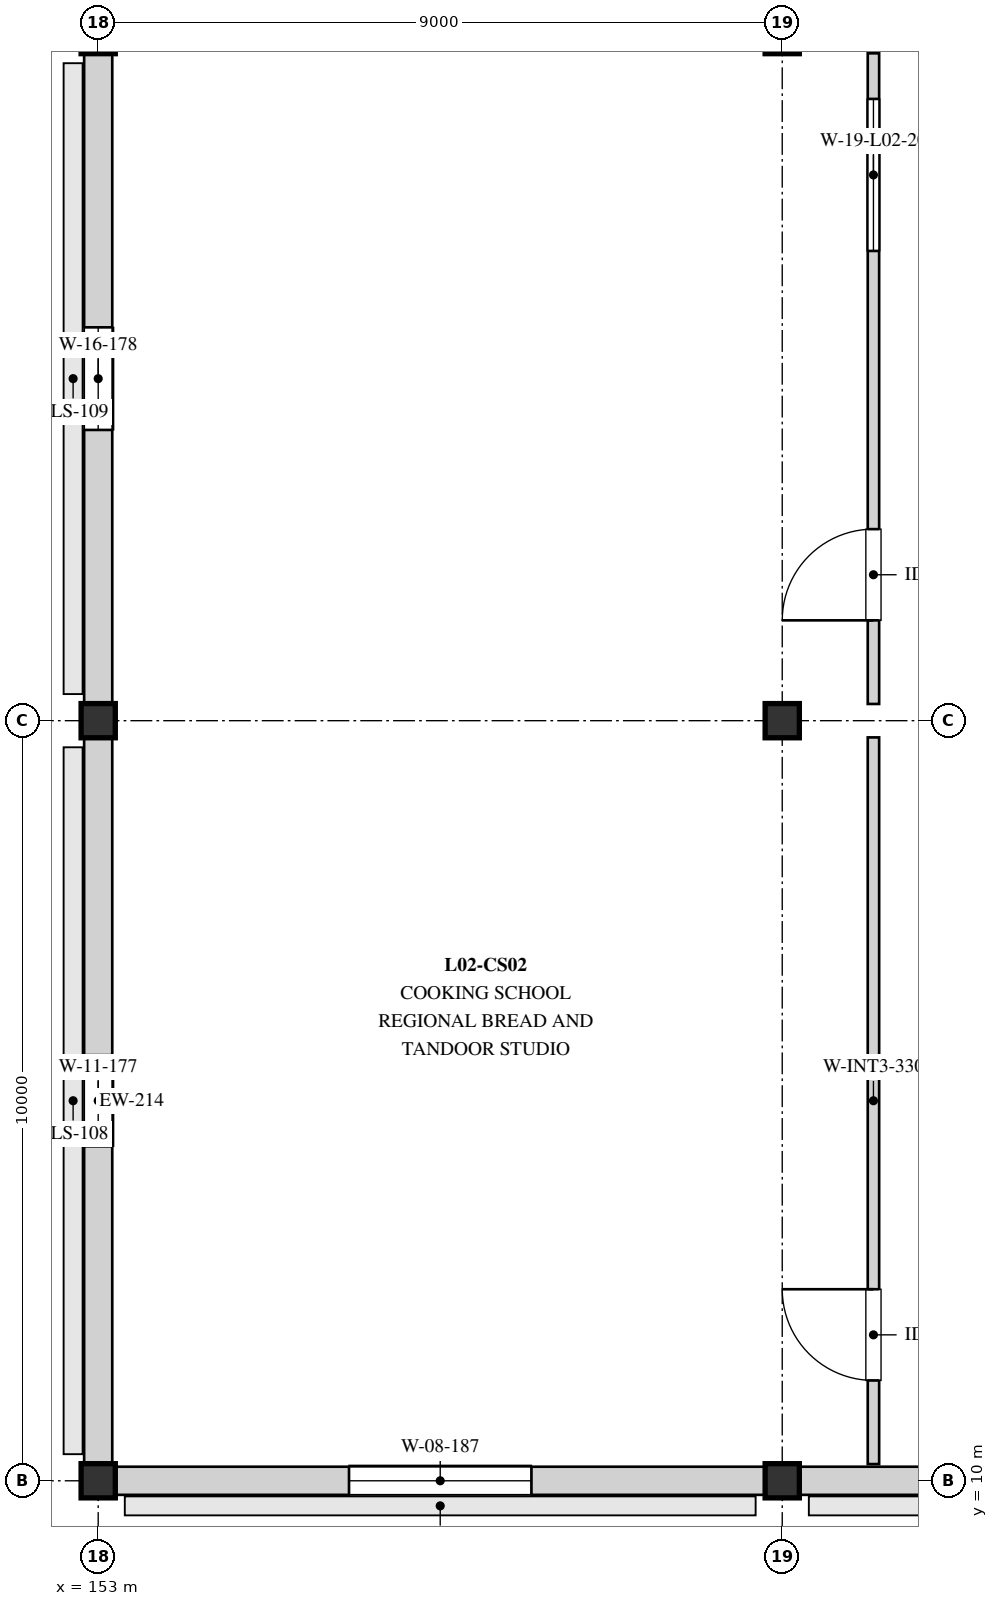
"""IFC4 building model, lengths in metres.
Left out: names, types, materials, properties, quantities, classifications, styles, units other than length and angle.
Written with IfcOpenShell. Run it as: python <this file> out.ifc"""

import sys

from ifc_helpers import new_model, si_unit, direction, frame, frame_2d, origin, origin_2d, place, context, subcontext, project, spatial, rectangle, extrude, element, fill, save


model = new_model("IFC4")
c1 = context("Model", 3, precision=1e-05, world=origin(), true_north=direction((0.0, 1.0)))
c2 = subcontext(c1, "Body", "Model", "MODEL_VIEW")
j1 = project(units=[si_unit("LENGTHUNIT", "METRE"), si_unit("PLANEANGLEUNIT", "RADIAN")], contexts=[c1])
p1 = place(None, origin())
s1 = spatial("IfcSite", under=j1, at=p1, CompositionType="ELEMENT")
p2 = place(p1, origin())
s2 = spatial("IfcBuilding", under=s1, at=p2, CompositionType="ELEMENT")
p3 = place(p2, frame((0.0, 0.0, 8.4)))
s3 = spatial("IfcBuildingStorey", under=s2, at=p3, CompositionType="ELEMENT", Elevation=8.4)
for number, where, z_axis, x_axis in (
    (1, (153.0, 10.0, 0.0), (0.0, 0.0, 1.0), (1.0, 0.0, 0.0)),
    (2, (153.0, 20.0, 0.0), (0.0, 0.0, 1.0), (1.0, 0.0, 0.0)),
    (3, (153.0, 29.0, 0.0), (0.0, 0.0, 1.0), (1.0, 0.0, 0.0)),
    (4, (162.0, 10.0, 0.0), (0.0, 0.0, 1.0), (1.0, 0.0, 0.0)),
    (5, (162.0, 20.0, 0.0), (0.0, 0.0, 1.0), (1.0, 0.0, 0.0)),
    (6, (162.0, 29.0, 0.0), (0.0, 0.0, 1.0), (1.0, 0.0, 0.0)),
):
    element("IfcColumn", number, at=place(p3, frame(where, z_axis=z_axis, x_axis=x_axis)), inside=s3, PredefinedType="COLUMN", context=c2, shape_type="SweptSolid", body=[
        extrude(rectangle(XDim=0.45, YDim=0.45, at=origin_2d()), origin(), (0.0, 0.0, 1.0), 3.6),
    ])
p4 = place(p3, frame((153.0, 10.0, 0.0), z_axis=(0.0, 0.0, 1.0), x_axis=(0.0, 1.0, 0.0)))
e7 = element("IfcWall", 7, at=p4, inside=s3, PredefinedType="STANDARD", context=c2, shape_type="SweptSolid", body=[
    extrude(rectangle(XDim=10.0, YDim=0.37, at=frame_2d((5.0, 0.0))), origin(), (0.0, 0.0, 1.0), 2.48),
])
p5 = place(p4, frame((4.4, 0.0, 0.49)))
e8 = element("IfcOpeningElement", 8, at=p5, cuts=e7, PredefinedType="OPENING", context=c2, shape_type="SweptSolid", body=[
    extrude(rectangle(XDim=1.2, YDim=1.8, at=frame_2d((0.6, 0.9))), frame((0.0, 0.195, 0.0), z_axis=(0.0, -1.0, 0.0), x_axis=(1.0, 0.0, 0.0)), (0.0, 0.0, 1.0), 0.39),
])
p6 = place(p3, frame((153.0, 20.0, 0.0), z_axis=(0.0, 0.0, 1.0), x_axis=(0.0, 1.0, 0.0)))
e9 = element("IfcWall", 9, at=p6, inside=s3, PredefinedType="STANDARD", context=c2, shape_type="SweptSolid", body=[
    extrude(rectangle(XDim=9.0, YDim=0.37, at=frame_2d((4.5, 0.0))), origin(), (0.0, 0.0, 1.0), 2.48),
])
p7 = place(p6, frame((3.825, 0.0, 0.69)))
e10 = element("IfcOpeningElement", 10, at=p7, cuts=e9, PredefinedType="OPENING", context=c2, shape_type="SweptSolid", body=[
    extrude(rectangle(XDim=1.35, YDim=1.6, at=frame_2d((0.675, 0.8))), frame((0.0, 0.195, 0.0), z_axis=(0.0, -1.0, 0.0), x_axis=(1.0, 0.0, 0.0)), (0.0, 0.0, 1.0), 0.39),
])
p8 = place(p3, frame((153.0, 10.0, 0.0), z_axis=(0.0, 0.0, 1.0), x_axis=(1.0, 0.0, 0.0)))
e11 = element("IfcWall", 11, at=p8, inside=s3, PredefinedType="STANDARD", context=c2, shape_type="SweptSolid", body=[
    extrude(rectangle(XDim=9.0, YDim=0.37, at=frame_2d((4.5, 0.0))), origin(), (0.0, 0.0, 1.0), 2.48),
])
p9 = place(p8, frame((3.3, 0.0, 0.35)))
e12 = element("IfcOpeningElement", 12, at=p9, cuts=e11, PredefinedType="OPENING", context=c2, shape_type="SweptSolid", body=[
    extrude(rectangle(XDim=2.4, YDim=1.94, at=frame_2d((1.2, 0.97))), frame((0.0, 0.195, 0.0), z_axis=(0.0, -1.0, 0.0), x_axis=(1.0, 0.0, 0.0)), (0.0, 0.0, 1.0), 0.39),
])
p10 = place(p3, frame((162.0, 10.0, 0.0), z_axis=(0.0, 0.0, 1.0), x_axis=(1.0, 0.0, 0.0)))
e13 = element("IfcWall", 13, at=p10, inside=s3, PredefinedType="STANDARD", context=c2, shape_type="SweptSolid", body=[
    extrude(rectangle(XDim=9.0, YDim=0.37, at=frame_2d((4.5, 0.0))), origin(), (0.0, 0.0, 1.0), 2.48),
])
p11 = place(p10, frame((3.3, 0.0, 0.35)))
e14 = element("IfcOpeningElement", 14, at=p11, cuts=e13, PredefinedType="OPENING", context=c2, shape_type="SweptSolid", body=[
    extrude(rectangle(XDim=2.4, YDim=1.94, at=frame_2d((1.2, 0.97))), frame((0.0, 0.195, 0.0), z_axis=(0.0, -1.0, 0.0), x_axis=(1.0, 0.0, 0.0)), (0.0, 0.0, 1.0), 0.39),
])
p12 = place(p3, frame((163.2, 10.22, 0.0), z_axis=(0.0, 0.0, 1.0), x_axis=(0.0, 1.0, 0.0)))
e15 = element("IfcWall", 15, at=p12, inside=s3, PredefinedType="PARTITIONING", context=c2, shape_type="SweptSolid", body=[
    extrude(rectangle(XDim=9.56, YDim=0.15, at=frame_2d((4.78, 0.0))), origin(), (0.0, 0.0, 1.0), 2.4),
])
p13 = place(p12, frame((1.1, 0.0, 0.0)))
e16 = element("IfcOpeningElement", 16, at=p13, cuts=e15, PredefinedType="OPENING", context=c2, shape_type="SweptSolid", body=[
    extrude(rectangle(XDim=1.2, YDim=2.15, at=frame_2d((0.6, 1.075))), frame((0.0, 0.085, 0.0), z_axis=(0.0, -1.0, 0.0), x_axis=(1.0, 0.0, 0.0)), (0.0, 0.0, 1.0), 0.17),
])
p14 = place(p3, frame((163.2, 20.22, 0.0), z_axis=(0.0, 0.0, 1.0), x_axis=(0.0, 1.0, 0.0)))
e17 = element("IfcWall", 17, at=p14, inside=s3, PredefinedType="PARTITIONING", context=c2, shape_type="SweptSolid", body=[
    extrude(rectangle(XDim=8.56, YDim=0.15, at=frame_2d((4.28, 0.0))), origin(), (0.0, 0.0, 1.0), 2.4),
])
p15 = place(p14, frame((1.1, 0.0, 0.0)))
e18 = element("IfcOpeningElement", 18, at=p15, cuts=e17, PredefinedType="OPENING", context=c2, shape_type="SweptSolid", body=[
    extrude(rectangle(XDim=1.2, YDim=2.15, at=frame_2d((0.6, 1.075))), frame((0.0, 0.085, 0.0), z_axis=(0.0, -1.0, 0.0), x_axis=(1.0, 0.0, 0.0)), (0.0, 0.0, 1.0), 0.17),
])
p16 = place(p14, frame((5.96, 0.0, 0.87)))
e19 = element("IfcOpeningElement", 19, at=p16, cuts=e17, PredefinedType="OPENING", context=c2, shape_type="SweptSolid", body=[
    extrude(rectangle(XDim=2.0, YDim=1.35, at=frame_2d((1.0, 0.675))), frame((0.0, 0.085, 0.0), z_axis=(0.0, -1.0, 0.0), x_axis=(1.0, 0.0, 0.0)), (0.0, 0.0, 1.0), 0.17),
])
p17 = place(p5, origin())
e20 = element("IfcWindow", 20, at=p17, inside=s3, PartitioningType="SINGLE_PANEL", PredefinedType="WINDOW", context=c2, shape_type="SweptSolid", body=[
    extrude(rectangle(XDim=1.2, YDim=1.8, at=frame_2d((0.6, 0.9))), frame((0.0, 0.03, 0.0), z_axis=(0.0, -1.0, 0.0), x_axis=(1.0, 0.0, 0.0)), (0.0, 0.0, 1.0), 0.06),
])
fill(e8, e20)
p18 = place(p7, origin())
e21 = element("IfcWindow", 21, at=p18, inside=s3, PartitioningType="SINGLE_PANEL", PredefinedType="WINDOW", context=c2, shape_type="SweptSolid", body=[
    extrude(rectangle(XDim=1.35, YDim=1.6, at=frame_2d((0.675, 0.8))), frame((0.0, 0.03, 0.0), z_axis=(0.0, -1.0, 0.0), x_axis=(1.0, 0.0, 0.0)), (0.0, 0.0, 1.0), 0.06),
])
fill(e10, e21)
p19 = place(p9, origin())
e22 = element("IfcWindow", 22, at=p19, inside=s3, PartitioningType="SINGLE_PANEL", PredefinedType="WINDOW", context=c2, shape_type="SweptSolid", body=[
    extrude(rectangle(XDim=2.4, YDim=1.94, at=frame_2d((1.2, 0.97))), frame((0.0, 0.03, 0.0), z_axis=(0.0, -1.0, 0.0), x_axis=(1.0, 0.0, 0.0)), (0.0, 0.0, 1.0), 0.06),
])
fill(e12, e22)
p20 = place(p13, origin())
e23 = element("IfcDoor", 23, at=p20, inside=s3, OperationType="SINGLE_SWING_RIGHT", PredefinedType="DOOR", context=c2, shape_type="SweptSolid", body=[
    extrude(rectangle(XDim=1.2, YDim=2.15, at=frame_2d((0.6, 1.075))), frame((0.0, 0.025, 0.0), z_axis=(0.0, -1.0, 0.0), x_axis=(1.0, 0.0, 0.0)), (0.0, 0.0, 1.0), 0.05),
])
fill(e16, e23)
p21 = place(p15, origin())
e24 = element("IfcDoor", 24, at=p21, inside=s3, OperationType="SINGLE_SWING_LEFT", PredefinedType="DOOR", context=c2, shape_type="SweptSolid", body=[
    extrude(rectangle(XDim=1.2, YDim=2.15, at=frame_2d((0.6, 1.075))), frame((0.0, 0.025, 0.0), z_axis=(0.0, -1.0, 0.0), x_axis=(1.0, 0.0, 0.0)), (0.0, 0.0, 1.0), 0.05),
])
fill(e18, e24)
p22 = place(p16, origin())
e25 = element("IfcWindow", 25, at=p22, inside=s3, PartitioningType="SINGLE_PANEL", PredefinedType="WINDOW", context=c2, shape_type="SweptSolid", body=[
    extrude(rectangle(XDim=2.0, YDim=1.35, at=frame_2d((1.0, 0.675))), frame((0.0, 0.03, 0.0), z_axis=(0.0, -1.0, 0.0), x_axis=(1.0, 0.0, 0.0)), (0.0, 0.0, 1.0), 0.06),
])
fill(e19, e25)
save(model, sys.argv[1])
